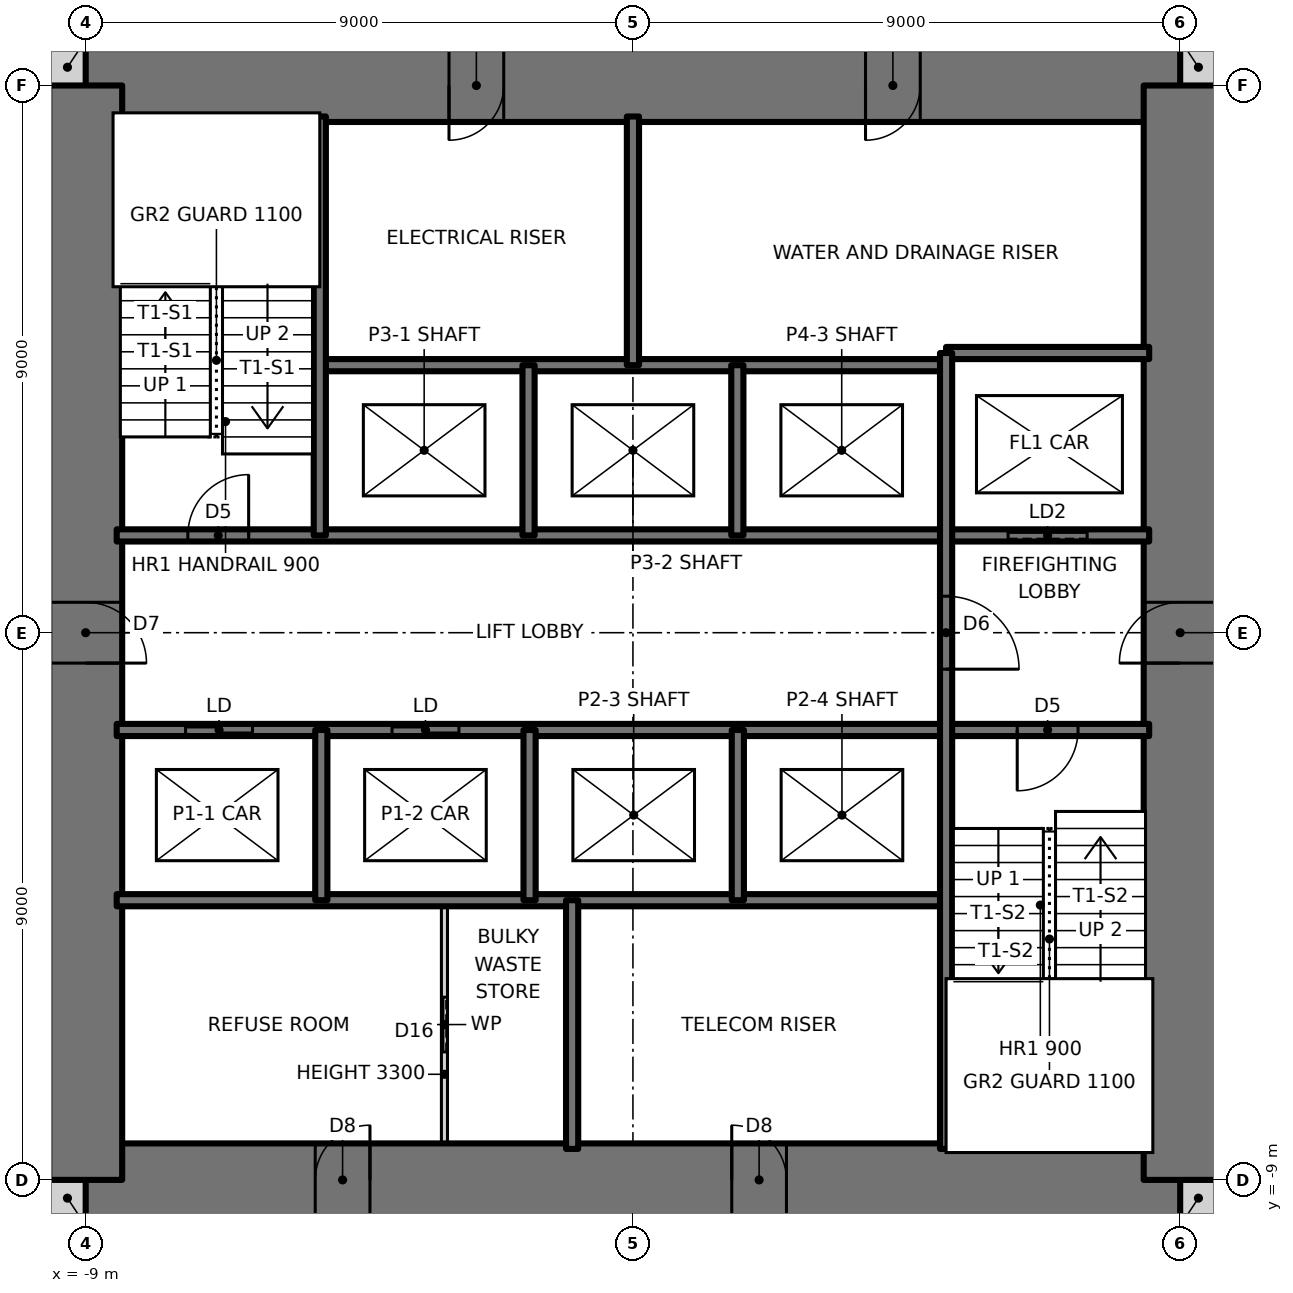
"""IFC4 building model, lengths in metres.
Left out: names, types, materials, properties, quantities, classifications, styles, units other than length and angle.
Written with IfcOpenShell. Run it as: python <this file> out.ifc"""

import sys

from ifc_helpers import new_model, si_unit, direction, frame, frame_2d, origin, place, context, subcontext, project, spatial, rectangle, extrude, element, fill, save


model = new_model("IFC4")
c1 = context("Model", 3, precision=1e-05, world=origin(), true_north=direction((0.0, 1.0)))
c2 = subcontext(c1, "Body", "Model", "MODEL_VIEW")
j1 = project(units=[si_unit("LENGTHUNIT", "METRE"), si_unit("PLANEANGLEUNIT", "RADIAN")], contexts=[c1])
p1 = place(None, origin())
s1 = spatial("IfcSite", under=j1, at=p1, CompositionType="ELEMENT")
p2 = place(p1, origin())
s2 = spatial("IfcBuilding", under=s1, at=p2, CompositionType="ELEMENT")
p3 = place(p2, frame((0.0, 0.0, 29.0)))
s3 = spatial("IfcBuildingStorey", under=s2, at=p3, CompositionType="ELEMENT", Elevation=29.0)
for number, where, z_axis, x_axis in (
    (1, (-9.6, -9.3, 0.0), (0.0, 0.0, 1.0), (1.0, 0.0, 0.0)),
    (2, (9.0, -9.3, 0.0), (0.0, 0.0, 1.0), (1.0, 0.0, 0.0)),
    (3, (9.0, 9.3, 0.0), (0.0, 0.0, 1.0), (1.0, 0.0, 0.0)),
    (4, (-9.6, 9.3, 0.0), (0.0, 0.0, 1.0), (1.0, 0.0, 0.0)),
):
    element("IfcWall", number, at=place(p3, frame(where, z_axis=z_axis, x_axis=x_axis)), inside=s3, PredefinedType="SOLIDWALL", context=c2, shape_type="SweptSolid", body=[
        extrude(rectangle(XDim=0.6, YDim=0.6, at=frame_2d((0.3, 0.0))), origin(), (0.0, 0.0, 1.0), 3.5),
    ])
p4 = place(p3, frame((-9.0, -9.0, 0.0), z_axis=(0.0, 0.0, 1.0), x_axis=(1.0, 0.0, 0.0)))
e5 = element("IfcWall", 5, at=p4, inside=s3, PredefinedType="SHEAR", context=c2, shape_type="SweptSolid", body=[
    extrude(rectangle(XDim=18.0, YDim=1.2, at=frame_2d((9.0, 0.0))), origin(), (0.0, 0.0, 1.0), 3.5),
])
p5 = place(p4, frame((3.775, 0.0, 0.0)))
e6 = element("IfcOpeningElement", 6, at=p5, cuts=e5, PredefinedType="OPENING", context=c2, shape_type="SweptSolid", body=[
    extrude(rectangle(XDim=0.9, YDim=2.1, at=frame_2d((0.45, 1.05))), frame((0.0, 0.61, 0.0), z_axis=(0.0, -1.0, 0.0), x_axis=(1.0, 0.0, 0.0)), (0.0, 0.0, 1.0), 1.22),
])
p6 = place(p4, frame((10.625, 0.0, 0.0)))
e7 = element("IfcOpeningElement", 7, at=p6, cuts=e5, PredefinedType="OPENING", context=c2, shape_type="SweptSolid", body=[
    extrude(rectangle(XDim=0.9, YDim=2.1, at=frame_2d((0.45, 1.05))), frame((0.0, 0.61, 0.0), z_axis=(0.0, -1.0, 0.0), x_axis=(1.0, 0.0, 0.0)), (0.0, 0.0, 1.0), 1.22),
])
p7 = place(p3, frame((9.0, 9.0, 0.0), z_axis=(0.0, 0.0, 1.0), x_axis=(-1.0, 0.0, 0.0)))
e8 = element("IfcWall", 8, at=p7, inside=s3, PredefinedType="SHEAR", context=c2, shape_type="SweptSolid", body=[
    extrude(rectangle(XDim=18.0, YDim=1.2, at=frame_2d((9.0, 0.0))), origin(), (0.0, 0.0, 1.0), 3.5),
])
p8 = place(p7, frame((11.125, 0.0, 0.0)))
e9 = element("IfcOpeningElement", 9, at=p8, cuts=e8, PredefinedType="OPENING", context=c2, shape_type="SweptSolid", body=[
    extrude(rectangle(XDim=0.9, YDim=2.1, at=frame_2d((0.45, 1.05))), frame((0.0, 0.61, 0.0), z_axis=(0.0, -1.0, 0.0), x_axis=(1.0, 0.0, 0.0)), (0.0, 0.0, 1.0), 1.22),
])
p9 = place(p7, frame((4.275, 0.0, 0.0)))
e10 = element("IfcOpeningElement", 10, at=p9, cuts=e8, PredefinedType="OPENING", context=c2, shape_type="SweptSolid", body=[
    extrude(rectangle(XDim=0.9, YDim=2.1, at=frame_2d((0.45, 1.05))), frame((0.0, 0.61, 0.0), z_axis=(0.0, -1.0, 0.0), x_axis=(1.0, 0.0, 0.0)), (0.0, 0.0, 1.0), 1.22),
])
p10 = place(p3, frame((9.0, -9.0, 0.0), z_axis=(0.0, 0.0, 1.0), x_axis=(0.0, 1.0, 0.0)))
e11 = element("IfcWall", 11, at=p10, inside=s3, PredefinedType="SHEAR", context=c2, shape_type="SweptSolid", body=[
    extrude(rectangle(XDim=18.0, YDim=1.2, at=frame_2d((9.0, 0.0))), origin(), (0.0, 0.0, 1.0), 3.5),
])
p11 = place(p10, frame((8.5, 0.0, 0.0)))
e12 = element("IfcOpeningElement", 12, at=p11, cuts=e11, PredefinedType="OPENING", context=c2, shape_type="SweptSolid", body=[
    extrude(rectangle(XDim=1.0, YDim=2.1, at=frame_2d((0.5, 1.05))), frame((0.0, 0.61, 0.0), z_axis=(0.0, -1.0, 0.0), x_axis=(1.0, 0.0, 0.0)), (0.0, 0.0, 1.0), 1.22),
])
p12 = place(p3, frame((-9.0, 9.0, 0.0), z_axis=(0.0, 0.0, 1.0), x_axis=(0.0, -1.0, 0.0)))
e13 = element("IfcWall", 13, at=p12, inside=s3, PredefinedType="SHEAR", context=c2, shape_type="SweptSolid", body=[
    extrude(rectangle(XDim=18.0, YDim=1.2, at=frame_2d((9.0, 0.0))), origin(), (0.0, 0.0, 1.0), 3.5),
])
p13 = place(p12, frame((8.5, 0.0, 0.0)))
e14 = element("IfcOpeningElement", 14, at=p13, cuts=e13, PredefinedType="OPENING", context=c2, shape_type="SweptSolid", body=[
    extrude(rectangle(XDim=1.0, YDim=2.1, at=frame_2d((0.5, 1.05))), frame((0.0, 0.61, 0.0), z_axis=(0.0, -1.0, 0.0), x_axis=(1.0, 0.0, 0.0)), (0.0, 0.0, 1.0), 1.22),
])
p14 = place(p3, frame((-8.49, -4.4, 0.0), z_axis=(0.0, 0.0, 1.0), x_axis=(1.0, 0.0, 0.0)))
e15 = element("IfcWall", 15, at=p14, inside=s3, PredefinedType="SOLIDWALL", context=c2, shape_type="SweptSolid", body=[
    extrude(rectangle(XDim=13.64, YDim=0.2, at=frame_2d((6.82, 0.0))), origin(), (0.0, 0.0, 1.0), 3.5),
])
p15 = place(p3, frame((-8.49, -1.6, 0.0), z_axis=(0.0, 0.0, 1.0), x_axis=(1.0, 0.0, 0.0)))
e16 = element("IfcWall", 16, at=p15, inside=s3, PredefinedType="SOLIDWALL", context=c2, shape_type="SweptSolid", body=[
    extrude(rectangle(XDim=16.98, YDim=0.2, at=frame_2d((8.49, 0.0))), origin(), (0.0, 0.0, 1.0), 3.5),
])
p16 = place(p15, frame((14.81, 0.0, 0.0)))
e17 = element("IfcOpeningElement", 17, at=p16, cuts=e16, PredefinedType="OPENING", context=c2, shape_type="SweptSolid", body=[
    extrude(rectangle(XDim=1.0, YDim=2.1, at=frame_2d((0.5, 1.05))), frame((0.0, 0.11, 0.0), z_axis=(0.0, -1.0, 0.0), x_axis=(1.0, 0.0, 0.0)), (0.0, 0.0, 1.0), 0.22),
])
p17 = place(p15, frame((1.133, 0.0, 0.0)))
e18 = element("IfcOpeningElement", 18, at=p17, cuts=e16, PredefinedType="OPENING", context=c2, shape_type="SweptSolid", body=[
    extrude(rectangle(XDim=1.1, YDim=2.1, at=frame_2d((0.55, 1.05))), frame((0.0, 0.11, 0.0), z_axis=(0.0, -1.0, 0.0), x_axis=(1.0, 0.0, 0.0)), (0.0, 0.0, 1.0), 0.22),
])
p18 = place(p15, frame((4.528, 0.0, 0.0)))
e19 = element("IfcOpeningElement", 19, at=p18, cuts=e16, PredefinedType="OPENING", context=c2, shape_type="SweptSolid", body=[
    extrude(rectangle(XDim=1.1, YDim=2.1, at=frame_2d((0.55, 1.05))), frame((0.0, 0.11, 0.0), z_axis=(0.0, -1.0, 0.0), x_axis=(1.0, 0.0, 0.0)), (0.0, 0.0, 1.0), 0.22),
])
p19 = place(p3, frame((-8.49, 1.6, 0.0), z_axis=(0.0, 0.0, 1.0), x_axis=(1.0, 0.0, 0.0)))
e20 = element("IfcWall", 20, at=p19, inside=s3, PredefinedType="SOLIDWALL", context=c2, shape_type="SweptSolid", body=[
    extrude(rectangle(XDim=16.98, YDim=0.2, at=frame_2d((8.49, 0.0))), origin(), (0.0, 0.0, 1.0), 3.5),
])
p20 = place(p19, frame((1.17, 0.0, 0.0)))
e21 = element("IfcOpeningElement", 21, at=p20, cuts=e20, PredefinedType="OPENING", context=c2, shape_type="SweptSolid", body=[
    extrude(rectangle(XDim=1.0, YDim=2.1, at=frame_2d((0.5, 1.05))), frame((0.0, 0.11, 0.0), z_axis=(0.0, -1.0, 0.0), x_axis=(1.0, 0.0, 0.0)), (0.0, 0.0, 1.0), 0.22),
])
p21 = place(p19, frame((14.66, 0.0, 0.0)))
e22 = element("IfcOpeningElement", 22, at=p21, cuts=e20, PredefinedType="OPENING", context=c2, shape_type="SweptSolid", body=[
    extrude(rectangle(XDim=1.3, YDim=2.1, at=frame_2d((0.65, 1.05))), frame((0.0, 0.11, 0.0), z_axis=(0.0, -1.0, 0.0), x_axis=(1.0, 0.0, 0.0)), (0.0, 0.0, 1.0), 0.22),
])
p22 = place(p3, frame((-5.15, 4.4, 0.0), z_axis=(0.0, 0.0, 1.0), x_axis=(1.0, 0.0, 0.0)))
e23 = element("IfcWall", 23, at=p22, inside=s3, PredefinedType="SOLIDWALL", context=c2, shape_type="SweptSolid", body=[
    extrude(rectangle(XDim=10.3, YDim=0.2, at=frame_2d((5.15, 0.0))), origin(), (0.0, 0.0, 1.0), 3.5),
])
p23 = place(p3, frame((5.15, 4.6, 0.0), z_axis=(0.0, 0.0, 1.0), x_axis=(1.0, 0.0, 0.0)))
e24 = element("IfcWall", 24, at=p23, inside=s3, PredefinedType="SOLIDWALL", context=c2, shape_type="SweptSolid", body=[
    extrude(rectangle(XDim=3.34, YDim=0.2, at=frame_2d((1.67, 0.0))), origin(), (0.0, 0.0, 1.0), 3.5),
])
p24 = place(p3, frame((5.15, -8.49, 0.0), z_axis=(0.0, 0.0, 1.0), x_axis=(0.0, 1.0, 0.0)))
e25 = element("IfcWall", 25, at=p24, inside=s3, PredefinedType="SOLIDWALL", context=c2, shape_type="SweptSolid", body=[
    extrude(rectangle(XDim=13.09, YDim=0.2, at=frame_2d((6.545, 0.0))), origin(), (0.0, 0.0, 1.0), 3.5),
])
p25 = place(p24, frame((7.89, 0.0, 0.0)))
e26 = element("IfcOpeningElement", 26, at=p25, cuts=e25, PredefinedType="OPENING", context=c2, shape_type="SweptSolid", body=[
    extrude(rectangle(XDim=1.2, YDim=2.1, at=frame_2d((0.6, 1.05))), frame((0.0, 0.11, 0.0), z_axis=(0.0, -1.0, 0.0), x_axis=(1.0, 0.0, 0.0)), (0.0, 0.0, 1.0), 0.22),
])
for number, where, z_axis, x_axis in (
    (27, (1.725, -4.4, 0.0), (0.0, 0.0, 1.0), (0.0, 1.0, 0.0)),
    (28, (1.717, 1.6, 0.0), (0.0, 0.0, 1.0), (0.0, 1.0, 0.0)),
):
    element("IfcWall", number, at=place(p3, frame(where, z_axis=z_axis, x_axis=x_axis)), inside=s3, PredefinedType="SOLIDWALL", context=c2, shape_type="SweptSolid", body=[
        extrude(rectangle(XDim=2.8, YDim=0.2, at=frame_2d((1.4, 0.0))), origin(), (0.0, 0.0, 1.0), 3.5),
    ])
for number, where, z_axis, x_axis in (
    (29, (0.0, 4.4, 0.0), (0.0, 0.0, 1.0), (0.0, 1.0, 0.0)),
    (30, (-1.0, -8.49, 0.0), (0.0, 0.0, 1.0), (0.0, 1.0, 0.0)),
):
    element("IfcWall", number, at=place(p3, frame(where, z_axis=z_axis, x_axis=x_axis)), inside=s3, PredefinedType="SOLIDWALL", context=c2, shape_type="SweptSolid", body=[
        extrude(rectangle(XDim=4.09, YDim=0.2, at=frame_2d((2.045, 0.0))), origin(), (0.0, 0.0, 1.0), 3.5),
    ])
for number, where, z_axis, x_axis in (
    (31, (-1.7, -4.4, 0.0), (0.0, 0.0, 1.0), (0.0, 1.0, 0.0)),
    (32, (-1.717, 1.6, 0.0), (0.0, 0.0, 1.0), (0.0, 1.0, 0.0)),
):
    element("IfcWall", number, at=place(p3, frame(where, z_axis=z_axis, x_axis=x_axis)), inside=s3, PredefinedType="SOLIDWALL", context=c2, shape_type="SweptSolid", body=[
        extrude(rectangle(XDim=2.8, YDim=0.2, at=frame_2d((1.4, 0.0))), origin(), (0.0, 0.0, 1.0), 3.5),
    ])
p26 = place(p3, frame((-3.1, -8.49, 0.0), z_axis=(0.0, 0.0, 1.0), x_axis=(0.0, 1.0, 0.0)))
e33 = element("IfcWall", 33, at=p26, inside=s3, PredefinedType="PARTITIONING", context=c2, shape_type="SweptSolid", body=[
    extrude(rectangle(XDim=4.09, YDim=0.1, at=frame_2d((2.045, 0.0))), origin(), (0.0, 0.0, 1.0), 3.3),
])
p27 = place(p26, frame((1.595, 0.0, 0.0)))
e34 = element("IfcOpeningElement", 34, at=p27, cuts=e33, PredefinedType="OPENING", context=c2, shape_type="SweptSolid", body=[
    extrude(rectangle(XDim=0.9, YDim=2.1, at=frame_2d((0.45, 1.05))), frame((0.0, 0.06, 0.0), z_axis=(0.0, -1.0, 0.0), x_axis=(1.0, 0.0, 0.0)), (0.0, 0.0, 1.0), 0.12),
])
p28 = place(p3, frame((-5.125, -4.4, 0.0), z_axis=(0.0, 0.0, 1.0), x_axis=(0.0, 1.0, 0.0)))
e35 = element("IfcWall", 35, at=p28, inside=s3, PredefinedType="SOLIDWALL", context=c2, shape_type="SweptSolid", body=[
    extrude(rectangle(XDim=2.8, YDim=0.2, at=frame_2d((1.4, 0.0))), origin(), (0.0, 0.0, 1.0), 3.5),
])
p29 = place(p3, frame((-5.15, 1.6, 0.0), z_axis=(0.0, 0.0, 1.0), x_axis=(0.0, 1.0, 0.0)))
e36 = element("IfcWall", 36, at=p29, inside=s3, PredefinedType="SOLIDWALL", context=c2, shape_type="SweptSolid", body=[
    extrude(rectangle(XDim=6.89, YDim=0.2, at=frame_2d((3.445, 0.0))), origin(), (0.0, 0.0, 1.0), 3.5),
])
p30 = place(p20, origin())
e37 = element("IfcDoor", 37, at=p30, inside=s3, OperationType="SINGLE_SWING_RIGHT", PredefinedType="DOOR", context=c2, shape_type="SweptSolid", body=[
    extrude(rectangle(XDim=1.0, YDim=2.1, at=frame_2d((0.5, 1.05))), frame((0.0, 0.025, 0.0), z_axis=(0.0, -1.0, 0.0), x_axis=(1.0, 0.0, 0.0)), (0.0, 0.0, 1.0), 0.05),
])
fill(e21, e37)
p31 = place(p16, frame((1.0, 0.0, 0.0), z_axis=(0.0, 0.0, 1.0), x_axis=(-1.0, 0.0, 0.0)))
e38 = element("IfcDoor", 38, at=p31, inside=s3, OperationType="SINGLE_SWING_RIGHT", PredefinedType="DOOR", context=c2, shape_type="SweptSolid", body=[
    extrude(rectangle(XDim=1.0, YDim=2.1, at=frame_2d((0.5, 1.05))), frame((0.0, 0.025, 0.0), z_axis=(0.0, -1.0, 0.0), x_axis=(1.0, 0.0, 0.0)), (0.0, 0.0, 1.0), 0.05),
])
fill(e17, e38)
p32 = place(p25, frame((1.2, 0.0, 0.0), z_axis=(0.0, 0.0, 1.0), x_axis=(-1.0, 0.0, 0.0)))
e39 = element("IfcDoor", 39, at=p32, inside=s3, OperationType="SINGLE_SWING_RIGHT", PredefinedType="DOOR", context=c2, shape_type="SweptSolid", body=[
    extrude(rectangle(XDim=1.2, YDim=2.1, at=frame_2d((0.6, 1.05))), frame((0.0, 0.025, 0.0), z_axis=(0.0, -1.0, 0.0), x_axis=(1.0, 0.0, 0.0)), (0.0, 0.0, 1.0), 0.05),
])
fill(e26, e39)
p33 = place(p27, origin())
e40 = element("IfcDoor", 40, at=p33, inside=s3, OperationType="SLIDING_TO_LEFT", PredefinedType="DOOR", context=c2, shape_type="SweptSolid", body=[
    extrude(rectangle(XDim=0.9, YDim=2.1, at=frame_2d((0.45, 1.05))), frame((0.0, 0.025, 0.0), z_axis=(0.0, -1.0, 0.0), x_axis=(1.0, 0.0, 0.0)), (0.0, 0.0, 1.0), 0.05),
])
fill(e34, e40)
p34 = place(p13, origin())
e41 = element("IfcDoor", 41, at=p34, inside=s3, OperationType="SINGLE_SWING_RIGHT", PredefinedType="DOOR", context=c2, shape_type="SweptSolid", body=[
    extrude(rectangle(XDim=1.0, YDim=2.1, at=frame_2d((0.5, 1.05))), frame((0.0, 0.025, 0.0), z_axis=(0.0, -1.0, 0.0), x_axis=(1.0, 0.0, 0.0)), (0.0, 0.0, 1.0), 0.05),
])
fill(e14, e41)
p35 = place(p11, origin())
e42 = element("IfcDoor", 42, at=p35, inside=s3, OperationType="SINGLE_SWING_LEFT", PredefinedType="DOOR", context=c2, shape_type="SweptSolid", body=[
    extrude(rectangle(XDim=1.0, YDim=2.1, at=frame_2d((0.5, 1.05))), frame((0.0, 0.025, 0.0), z_axis=(0.0, -1.0, 0.0), x_axis=(1.0, 0.0, 0.0)), (0.0, 0.0, 1.0), 0.05),
])
fill(e12, e42)
p36 = place(p8, origin())
e43 = element("IfcDoor", 43, at=p36, inside=s3, OperationType="SINGLE_SWING_RIGHT", PredefinedType="DOOR", context=c2, shape_type="SweptSolid", body=[
    extrude(rectangle(XDim=0.9, YDim=2.1, at=frame_2d((0.45, 1.05))), frame((0.0, 0.025, 0.0), z_axis=(0.0, -1.0, 0.0), x_axis=(1.0, 0.0, 0.0)), (0.0, 0.0, 1.0), 0.05),
])
fill(e9, e43)
p37 = place(p9, origin())
e44 = element("IfcDoor", 44, at=p37, inside=s3, OperationType="SINGLE_SWING_RIGHT", PredefinedType="DOOR", context=c2, shape_type="SweptSolid", body=[
    extrude(rectangle(XDim=0.9, YDim=2.1, at=frame_2d((0.45, 1.05))), frame((0.0, 0.025, 0.0), z_axis=(0.0, -1.0, 0.0), x_axis=(1.0, 0.0, 0.0)), (0.0, 0.0, 1.0), 0.05),
])
fill(e10, e44)
p38 = place(p5, origin())
e45 = element("IfcDoor", 45, at=p38, inside=s3, OperationType="SINGLE_SWING_RIGHT", PredefinedType="DOOR", context=c2, shape_type="SweptSolid", body=[
    extrude(rectangle(XDim=0.9, YDim=2.1, at=frame_2d((0.45, 1.05))), frame((0.0, 0.025, 0.0), z_axis=(0.0, -1.0, 0.0), x_axis=(1.0, 0.0, 0.0)), (0.0, 0.0, 1.0), 0.05),
])
fill(e6, e45)
p39 = place(p6, origin())
e46 = element("IfcDoor", 46, at=p39, inside=s3, OperationType="SINGLE_SWING_LEFT", PredefinedType="DOOR", context=c2, shape_type="SweptSolid", body=[
    extrude(rectangle(XDim=0.9, YDim=2.1, at=frame_2d((0.45, 1.05))), frame((0.0, 0.025, 0.0), z_axis=(0.0, -1.0, 0.0), x_axis=(1.0, 0.0, 0.0)), (0.0, 0.0, 1.0), 0.05),
])
fill(e7, e46)
p40 = place(p17, origin())
e47 = element("IfcDoor", 47, at=p40, inside=s3, OperationType="DOUBLE_DOOR_SLIDING", PredefinedType="DOOR", context=c2, shape_type="SweptSolid", body=[
    extrude(rectangle(XDim=1.1, YDim=2.1, at=frame_2d((0.55, 1.05))), frame((0.0, 0.025, 0.0), z_axis=(0.0, -1.0, 0.0), x_axis=(1.0, 0.0, 0.0)), (0.0, 0.0, 1.0), 0.05),
])
fill(e18, e47)
p41 = place(p18, origin())
e48 = element("IfcDoor", 48, at=p41, inside=s3, OperationType="DOUBLE_DOOR_SLIDING", PredefinedType="DOOR", context=c2, shape_type="SweptSolid", body=[
    extrude(rectangle(XDim=1.1, YDim=2.1, at=frame_2d((0.55, 1.05))), frame((0.0, 0.025, 0.0), z_axis=(0.0, -1.0, 0.0), x_axis=(1.0, 0.0, 0.0)), (0.0, 0.0, 1.0), 0.05),
])
fill(e19, e48)
p42 = place(p21, origin())
e49 = element("IfcDoor", 49, at=p42, inside=s3, OperationType="SLIDING_TO_LEFT", PredefinedType="DOOR", context=c2, shape_type="SweptSolid", body=[
    extrude(rectangle(XDim=1.3, YDim=2.1, at=frame_2d((0.65, 1.05))), frame((0.0, 0.025, 0.0), z_axis=(0.0, -1.0, 0.0), x_axis=(1.0, 0.0, 0.0)), (0.0, 0.0, 1.0), 0.05),
])
fill(e22, e49)
save(model, sys.argv[1])
